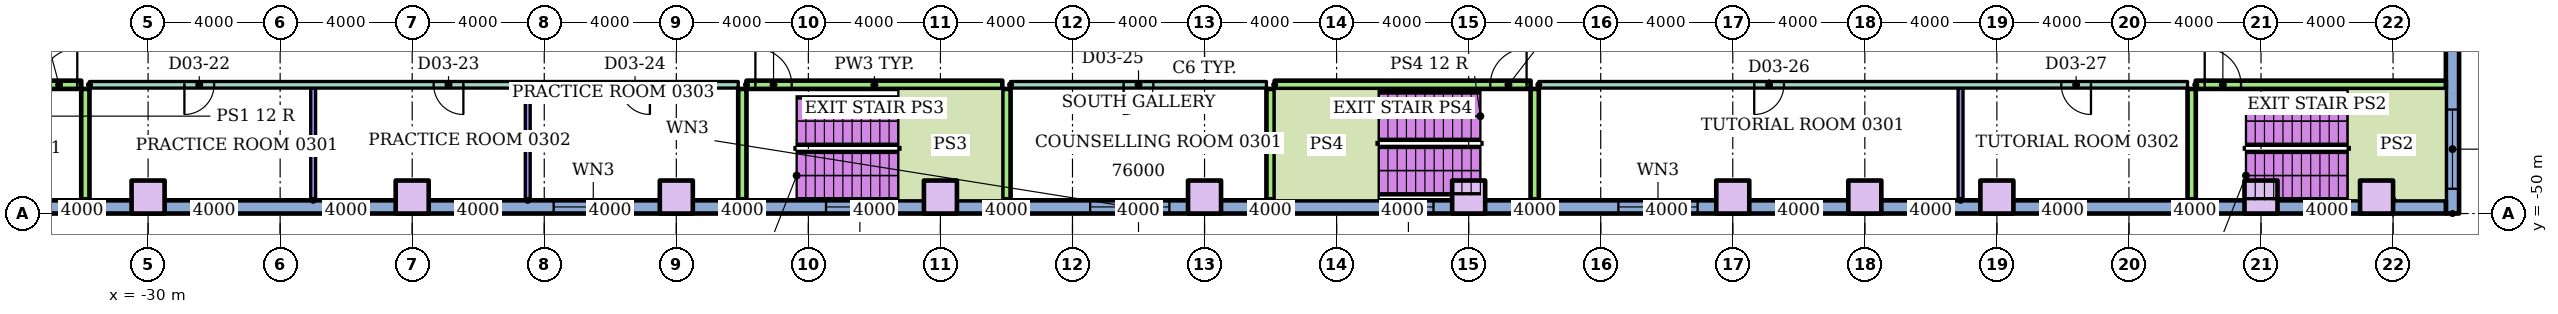
"""IFC4 building model, lengths in metres.
Left out: names, types, materials, properties, quantities, classifications, styles, units other than length and angle.
Written with IfcOpenShell. Run it as: python <this file> out.ifc"""

import sys

from ifc_helpers import new_model, si_unit, direction, frame, frame_2d, origin, origin_2d, place, context, subcontext, project, spatial, rectangle, extrude, element, fill, save


model = new_model("IFC4")
c1 = context("Model", 3, precision=1e-05, world=origin(), true_north=direction((0.0, 1.0)))
c2 = subcontext(c1, "Body", "Model", "MODEL_VIEW")
j1 = project(units=[si_unit("LENGTHUNIT", "METRE"), si_unit("PLANEANGLEUNIT", "RADIAN")], contexts=[c1])
p1 = place(None, origin())
s1 = spatial("IfcSite", under=j1, at=p1, CompositionType="ELEMENT")
p2 = place(p1, origin())
s2 = spatial("IfcBuilding", under=s1, at=p2, CompositionType="ELEMENT")
p3 = place(p2, frame((0.0, 0.0, 14.0)))
s3 = spatial("IfcBuildingStorey", under=s2, at=p3, CompositionType="ELEMENT", Elevation=14.0)
for number, where in (
    (1, (-30.0, -49.5, 0.0)),
    (2, (-22.0, -49.5, 0.0)),
    (3, (-14.0, -49.5, 0.0)),
    (4, (-6.0, -49.5, 0.0)),
    (5, (2.0, -49.5, 0.0)),
    (6, (10.0, -49.5, 0.0)),
    (7, (18.0, -49.5, 0.0)),
    (8, (22.0, -49.5, 0.0)),
    (9, (26.0, -49.5, 0.0)),
    (10, (34.0, -49.5, 0.0)),
    (11, (37.5, -49.5, 0.0)),
):
    element("IfcColumn", number, at=place(p3, frame(where)), inside=s3, PredefinedType="COLUMN", context=c2, shape_type="SweptSolid", body=[
        extrude(rectangle(XDim=1.0, YDim=1.0, at=origin_2d()), origin(), (0.0, 0.0, 1.0), 4.0),
    ])
p4 = place(p3, frame((39.8, -50.0, 0.0), z_axis=(0.0, 0.0, 1.0), x_axis=(0.0, 1.0, 0.0)))
e12 = element("IfcWall", 12, at=p4, inside=s3, PredefinedType="STANDARD", context=c2, shape_type="SweptSolid", body=[
    extrude(rectangle(XDim=70.0, YDim=0.4, at=frame_2d((35.0, 0.0))), origin(), (0.0, 0.0, 1.0), 3.7),
])
p5 = place(p4, frame((0.75, 0.0, 0.9)))
e13 = element("IfcOpeningElement", 13, at=p5, cuts=e12, PredefinedType="OPENING", context=c2, shape_type="SweptSolid", body=[
    extrude(rectangle(XDim=2.4, YDim=2.1, at=frame_2d((1.2, 1.05))), frame((0.0, 0.21, 0.0), z_axis=(0.0, -1.0, 0.0), x_axis=(1.0, 0.0, 0.0)), (0.0, 0.0, 1.0), 0.42),
])
p6 = place(p4, frame((28.863, 0.0, 0.9)))
e14 = element("IfcOpeningElement", 14, at=p6, cuts=e12, PredefinedType="OPENING", context=c2, shape_type="SweptSolid", body=[
    extrude(rectangle(XDim=2.4, YDim=2.1, at=frame_2d((1.2, 1.05))), frame((0.0, 0.21, 0.0), z_axis=(0.0, -1.0, 0.0), x_axis=(1.0, 0.0, 0.0)), (0.0, 0.0, 1.0), 0.42),
])
p7 = place(p4, frame((32.988, 0.0, 0.9)))
e15 = element("IfcOpeningElement", 15, at=p7, cuts=e12, PredefinedType="OPENING", context=c2, shape_type="SweptSolid", body=[
    extrude(rectangle(XDim=2.4, YDim=2.1, at=frame_2d((1.2, 1.05))), frame((0.0, 0.21, 0.0), z_axis=(0.0, -1.0, 0.0), x_axis=(1.0, 0.0, 0.0)), (0.0, 0.0, 1.0), 0.42),
])
p8 = place(p4, frame((37.113, 0.0, 0.9)))
e16 = element("IfcOpeningElement", 16, at=p8, cuts=e12, PredefinedType="OPENING", context=c2, shape_type="SweptSolid", body=[
    extrude(rectangle(XDim=2.4, YDim=2.1, at=frame_2d((1.2, 1.05))), frame((0.0, 0.21, 0.0), z_axis=(0.0, -1.0, 0.0), x_axis=(1.0, 0.0, 0.0)), (0.0, 0.0, 1.0), 0.42),
])
p9 = place(p4, frame((41.238, 0.0, 0.9)))
e17 = element("IfcOpeningElement", 17, at=p9, cuts=e12, PredefinedType="OPENING", context=c2, shape_type="SweptSolid", body=[
    extrude(rectangle(XDim=2.4, YDim=2.1, at=frame_2d((1.2, 1.05))), frame((0.0, 0.21, 0.0), z_axis=(0.0, -1.0, 0.0), x_axis=(1.0, 0.0, 0.0)), (0.0, 0.0, 1.0), 0.42),
])
p10 = place(p4, frame((45.363, 0.0, 0.9)))
e18 = element("IfcOpeningElement", 18, at=p10, cuts=e12, PredefinedType="OPENING", context=c2, shape_type="SweptSolid", body=[
    extrude(rectangle(XDim=2.4, YDim=2.1, at=frame_2d((1.2, 1.05))), frame((0.0, 0.21, 0.0), z_axis=(0.0, -1.0, 0.0), x_axis=(1.0, 0.0, 0.0)), (0.0, 0.0, 1.0), 0.42),
])
p11 = place(p4, frame((49.488, 0.0, 0.9)))
e19 = element("IfcOpeningElement", 19, at=p11, cuts=e12, PredefinedType="OPENING", context=c2, shape_type="SweptSolid", body=[
    extrude(rectangle(XDim=2.4, YDim=2.1, at=frame_2d((1.2, 1.05))), frame((0.0, 0.21, 0.0), z_axis=(0.0, -1.0, 0.0), x_axis=(1.0, 0.0, 0.0)), (0.0, 0.0, 1.0), 0.42),
])
p12 = place(p4, frame((53.613, 0.0, 0.9)))
e20 = element("IfcOpeningElement", 20, at=p12, cuts=e12, PredefinedType="OPENING", context=c2, shape_type="SweptSolid", body=[
    extrude(rectangle(XDim=2.4, YDim=2.1, at=frame_2d((1.2, 1.05))), frame((0.0, 0.21, 0.0), z_axis=(0.0, -1.0, 0.0), x_axis=(1.0, 0.0, 0.0)), (0.0, 0.0, 1.0), 0.42),
])
p13 = place(p4, frame((57.738, 0.0, 0.9)))
e21 = element("IfcOpeningElement", 21, at=p13, cuts=e12, PredefinedType="OPENING", context=c2, shape_type="SweptSolid", body=[
    extrude(rectangle(XDim=2.4, YDim=2.1, at=frame_2d((1.2, 1.05))), frame((0.0, 0.21, 0.0), z_axis=(0.0, -1.0, 0.0), x_axis=(1.0, 0.0, 0.0)), (0.0, 0.0, 1.0), 0.42),
])
p14 = place(p4, frame((62.05, 0.0, 0.9)))
e22 = element("IfcOpeningElement", 22, at=p14, cuts=e12, PredefinedType="OPENING", context=c2, shape_type="SweptSolid", body=[
    extrude(rectangle(XDim=2.4, YDim=2.1, at=frame_2d((1.2, 1.05))), frame((0.0, 0.21, 0.0), z_axis=(0.0, -1.0, 0.0), x_axis=(1.0, 0.0, 0.0)), (0.0, 0.0, 1.0), 0.42),
])
p15 = place(p4, frame((66.55, 0.0, 0.9)))
e23 = element("IfcOpeningElement", 23, at=p15, cuts=e12, PredefinedType="OPENING", context=c2, shape_type="SweptSolid", body=[
    extrude(rectangle(XDim=2.4, YDim=2.1, at=frame_2d((1.2, 1.05))), frame((0.0, 0.21, 0.0), z_axis=(0.0, -1.0, 0.0), x_axis=(1.0, 0.0, 0.0)), (0.0, 0.0, 1.0), 0.42),
])
p16 = place(p3, frame((-39.6, -49.8, 0.0)))
e24 = element("IfcWall", 24, at=p16, inside=s3, PredefinedType="STANDARD", context=c2, shape_type="SweptSolid", body=[
    extrude(rectangle(XDim=79.2, YDim=0.4, at=frame_2d((39.6, 0.0))), origin(), (0.0, 0.0, 1.0), 3.7),
])
p17 = place(p16, frame((21.885, 0.0, 0.9)))
e25 = element("IfcOpeningElement", 25, at=p17, cuts=e24, PredefinedType="OPENING", context=c2, shape_type="SweptSolid", body=[
    extrude(rectangle(XDim=2.4, YDim=2.1, at=frame_2d((1.2, 1.05))), frame((0.0, 0.21, 0.0), z_axis=(0.0, -1.0, 0.0), x_axis=(1.0, 0.0, 0.0)), (0.0, 0.0, 1.0), 0.42),
])
p18 = place(p16, frame((30.135, 0.0, 0.9)))
e26 = element("IfcOpeningElement", 26, at=p18, cuts=e24, PredefinedType="OPENING", context=c2, shape_type="SweptSolid", body=[
    extrude(rectangle(XDim=2.05, YDim=2.1, at=frame_2d((1.025, 1.05))), frame((0.0, 0.21, 0.0), z_axis=(0.0, -1.0, 0.0), x_axis=(1.0, 0.0, 0.0)), (0.0, 0.0, 1.0), 0.42),
])
p19 = place(p16, frame((38.135, 0.0, 0.9)))
e27 = element("IfcOpeningElement", 27, at=p19, cuts=e24, PredefinedType="OPENING", context=c2, shape_type="SweptSolid", body=[
    extrude(rectangle(XDim=2.4, YDim=2.1, at=frame_2d((1.2, 1.05))), frame((0.0, 0.21, 0.0), z_axis=(0.0, -1.0, 0.0), x_axis=(1.0, 0.0, 0.0)), (0.0, 0.0, 1.0), 0.42),
])
p20 = place(p16, frame((47.015, 0.0, 0.9)))
e28 = element("IfcOpeningElement", 28, at=p20, cuts=e24, PredefinedType="OPENING", context=c2, shape_type="SweptSolid", body=[
    extrude(rectangle(XDim=1.52, YDim=2.1, at=frame_2d((0.76, 1.05))), frame((0.0, 0.21, 0.0), z_axis=(0.0, -1.0, 0.0), x_axis=(1.0, 0.0, 0.0)), (0.0, 0.0, 1.0), 0.42),
])
p21 = place(p16, frame((54.135, 0.0, 0.9)))
e29 = element("IfcOpeningElement", 29, at=p21, cuts=e24, PredefinedType="OPENING", context=c2, shape_type="SweptSolid", body=[
    extrude(rectangle(XDim=2.4, YDim=2.1, at=frame_2d((1.2, 1.05))), frame((0.0, 0.21, 0.0), z_axis=(0.0, -1.0, 0.0), x_axis=(1.0, 0.0, 0.0)), (0.0, 0.0, 1.0), 0.42),
])
p22 = place(p3, frame((-31.775, -46.1, 0.0)))
e30 = element("IfcWall", 30, at=p22, inside=s3, PredefinedType="PARTITIONING", context=c2, shape_type="SweptSolid", body=[
    extrude(rectangle(XDim=19.65, YDim=0.2, at=frame_2d((9.825, 0.0))), origin(), (0.0, 0.0, 1.0), 3.7),
])
p23 = place(p22, frame((2.875, 0.0, 0.0)))
e31 = element("IfcOpeningElement", 31, at=p23, cuts=e30, PredefinedType="OPENING", context=c2, shape_type="SweptSolid", body=[
    extrude(rectangle(XDim=0.9, YDim=2.1, at=frame_2d((0.45, 1.05))), frame((0.0, 0.11, 0.0), z_axis=(0.0, -1.0, 0.0), x_axis=(1.0, 0.0, 0.0)), (0.0, 0.0, 1.0), 0.22),
])
p24 = place(p22, frame((10.425, 0.0, 0.0)))
e32 = element("IfcOpeningElement", 32, at=p24, cuts=e30, PredefinedType="OPENING", context=c2, shape_type="SweptSolid", body=[
    extrude(rectangle(XDim=0.9, YDim=2.1, at=frame_2d((0.45, 1.05))), frame((0.0, 0.11, 0.0), z_axis=(0.0, -1.0, 0.0), x_axis=(1.0, 0.0, 0.0)), (0.0, 0.0, 1.0), 0.22),
])
p25 = place(p22, frame((16.075, 0.0, 0.0)))
e33 = element("IfcOpeningElement", 33, at=p25, cuts=e30, PredefinedType="OPENING", context=c2, shape_type="SweptSolid", body=[
    extrude(rectangle(XDim=0.9, YDim=2.1, at=frame_2d((0.45, 1.05))), frame((0.0, 0.11, 0.0), z_axis=(0.0, -1.0, 0.0), x_axis=(1.0, 0.0, 0.0)), (0.0, 0.0, 1.0), 0.22),
])
p26 = place(p3, frame((-3.875, -46.1, 0.0)))
e34 = element("IfcWall", 34, at=p26, inside=s3, PredefinedType="PARTITIONING", context=c2, shape_type="SweptSolid", body=[
    extrude(rectangle(XDim=7.75, YDim=0.2, at=frame_2d((3.875, 0.0))), origin(), (0.0, 0.0, 1.0), 3.7),
])
p27 = place(p26, frame((3.425, 0.0, 0.0)))
e35 = element("IfcOpeningElement", 35, at=p27, cuts=e34, PredefinedType="OPENING", context=c2, shape_type="SweptSolid", body=[
    extrude(rectangle(XDim=0.9, YDim=2.1, at=frame_2d((0.45, 1.05))), frame((0.0, 0.11, 0.0), z_axis=(0.0, -1.0, 0.0), x_axis=(1.0, 0.0, 0.0)), (0.0, 0.0, 1.0), 0.22),
])
p28 = place(p3, frame((12.125, -46.1, 0.0)))
e36 = element("IfcWall", 36, at=p28, inside=s3, PredefinedType="PARTITIONING", context=c2, shape_type="SweptSolid", body=[
    extrude(rectangle(XDim=19.65, YDim=0.2, at=frame_2d((9.825, 0.0))), origin(), (0.0, 0.0, 1.0), 3.7),
])
p29 = place(p28, frame((6.525, 0.0, 0.0)))
e37 = element("IfcOpeningElement", 37, at=p29, cuts=e36, PredefinedType="OPENING", context=c2, shape_type="SweptSolid", body=[
    extrude(rectangle(XDim=0.9, YDim=2.1, at=frame_2d((0.45, 1.05))), frame((0.0, 0.11, 0.0), z_axis=(0.0, -1.0, 0.0), x_axis=(1.0, 0.0, 0.0)), (0.0, 0.0, 1.0), 0.22),
])
p30 = place(p28, frame((15.825, 0.0, 0.0)))
e38 = element("IfcOpeningElement", 38, at=p30, cuts=e36, PredefinedType="OPENING", context=c2, shape_type="SweptSolid", body=[
    extrude(rectangle(XDim=0.9, YDim=2.1, at=frame_2d((0.45, 1.05))), frame((0.0, 0.11, 0.0), z_axis=(0.0, -1.0, 0.0), x_axis=(1.0, 0.0, 0.0)), (0.0, 0.0, 1.0), 0.22),
])
p31 = place(p3, frame((-39.6, -46.1, 0.0)))
e39 = element("IfcWall", 39, at=p31, inside=s3, PredefinedType="SOLIDWALL", context=c2, shape_type="SweptSolid", body=[
    extrude(rectangle(XDim=7.575, YDim=0.25, at=frame_2d((3.788, 0.0))), origin(), (0.0, 0.0, 1.0), 3.7),
])
p32 = place(p31, frame((6.355, 0.0, 0.0)))
e40 = element("IfcOpeningElement", 40, at=p32, cuts=e39, PredefinedType="OPENING", context=c2, shape_type="SweptSolid", body=[
    extrude(rectangle(XDim=1.1, YDim=2.1, at=frame_2d((0.55, 1.05))), frame((0.0, 0.135, 0.0), z_axis=(0.0, -1.0, 0.0), x_axis=(1.0, 0.0, 0.0)), (0.0, 0.0, 1.0), 0.27),
])
p33 = place(p3, frame((-11.875, -46.1, 0.0)))
e41 = element("IfcWall", 41, at=p33, inside=s3, PredefinedType="SOLIDWALL", context=c2, shape_type="SweptSolid", body=[
    extrude(rectangle(XDim=7.75, YDim=0.25, at=frame_2d((3.875, 0.0))), origin(), (0.0, 0.0, 1.0), 3.7),
])
p34 = place(p33, frame((0.27, 0.0, 0.0)))
e42 = element("IfcOpeningElement", 42, at=p34, cuts=e41, PredefinedType="OPENING", context=c2, shape_type="SweptSolid", body=[
    extrude(rectangle(XDim=1.1, YDim=2.1, at=frame_2d((0.55, 1.05))), frame((0.0, 0.135, 0.0), z_axis=(0.0, -1.0, 0.0), x_axis=(1.0, 0.0, 0.0)), (0.0, 0.0, 1.0), 0.27),
])
p35 = place(p3, frame((4.125, -46.1, 0.0)))
e43 = element("IfcWall", 43, at=p35, inside=s3, PredefinedType="SOLIDWALL", context=c2, shape_type="SweptSolid", body=[
    extrude(rectangle(XDim=7.75, YDim=0.25, at=frame_2d((3.875, 0.0))), origin(), (0.0, 0.0, 1.0), 3.7),
])
p36 = place(p35, frame((6.53, 0.0, 0.0)))
e44 = element("IfcOpeningElement", 44, at=p36, cuts=e43, PredefinedType="OPENING", context=c2, shape_type="SweptSolid", body=[
    extrude(rectangle(XDim=1.1, YDim=2.1, at=frame_2d((0.55, 1.05))), frame((0.0, 0.135, 0.0), z_axis=(0.0, -1.0, 0.0), x_axis=(1.0, 0.0, 0.0)), (0.0, 0.0, 1.0), 0.27),
])
p37 = place(p3, frame((32.025, -46.1, 0.0)))
e45 = element("IfcWall", 45, at=p37, inside=s3, PredefinedType="SOLIDWALL", context=c2, shape_type="SweptSolid", body=[
    extrude(rectangle(XDim=7.575, YDim=0.25, at=frame_2d((3.788, 0.0))), origin(), (0.0, 0.0, 1.0), 3.7),
])
p38 = place(p37, frame((0.27, 0.0, 0.0)))
e46 = element("IfcOpeningElement", 46, at=p38, cuts=e45, PredefinedType="OPENING", context=c2, shape_type="SweptSolid", body=[
    extrude(rectangle(XDim=1.1, YDim=2.1, at=frame_2d((0.55, 1.05))), frame((0.0, 0.135, 0.0), z_axis=(0.0, -1.0, 0.0), x_axis=(1.0, 0.0, 0.0)), (0.0, 0.0, 1.0), 0.27),
])
p39 = place(p3, frame((-31.9, -49.6, 0.0), z_axis=(0.0, 0.0, 1.0), x_axis=(0.0, 1.0, 0.0)))
e47 = element("IfcWall", 47, at=p39, inside=s3, PredefinedType="SOLIDWALL", context=c2, shape_type="SweptSolid", body=[
    extrude(rectangle(XDim=3.375, YDim=0.25, at=frame_2d((1.688, 0.0))), origin(), (0.0, 0.0, 1.0), 3.7),
])
for number, where, z_axis, x_axis in (
    (48, (-25.0, -49.6, 0.0), (0.0, 0.0, 1.0), (0.0, 1.0, 0.0)),
    (49, (-18.5, -49.6, 0.0), (0.0, 0.0, 1.0), (0.0, 1.0, 0.0)),
):
    element("IfcWall", number, at=place(p3, frame(where, z_axis=z_axis, x_axis=x_axis)), inside=s3, PredefinedType="PARTITIONING", context=c2, shape_type="SweptSolid", body=[
        extrude(rectangle(XDim=3.4, YDim=0.15, at=frame_2d((1.7, 0.0))), origin(), (0.0, 0.0, 1.0), 3.7),
    ])
for number, where, z_axis, x_axis in (
    (50, (-12.0, -49.6, 0.0), (0.0, 0.0, 1.0), (0.0, 1.0, 0.0)),
    (51, (-4.0, -49.6, 0.0), (0.0, 0.0, 1.0), (0.0, 1.0, 0.0)),
    (52, (4.0, -49.6, 0.0), (0.0, 0.0, 1.0), (0.0, 1.0, 0.0)),
    (53, (12.0, -49.6, 0.0), (0.0, 0.0, 1.0), (0.0, 1.0, 0.0)),
):
    element("IfcWall", number, at=place(p3, frame(where, z_axis=z_axis, x_axis=x_axis)), inside=s3, PredefinedType="SOLIDWALL", context=c2, shape_type="SweptSolid", body=[
        extrude(rectangle(XDim=3.375, YDim=0.25, at=frame_2d((1.688, 0.0))), origin(), (0.0, 0.0, 1.0), 3.7),
    ])
p40 = place(p3, frame((24.9, -49.6, 0.0), z_axis=(0.0, 0.0, 1.0), x_axis=(0.0, 1.0, 0.0)))
e54 = element("IfcWall", 54, at=p40, inside=s3, PredefinedType="PARTITIONING", context=c2, shape_type="SweptSolid", body=[
    extrude(rectangle(XDim=3.4, YDim=0.15, at=frame_2d((1.7, 0.0))), origin(), (0.0, 0.0, 1.0), 3.7),
])
p41 = place(p3, frame((31.9, -49.6, 0.0), z_axis=(0.0, 0.0, 1.0), x_axis=(0.0, 1.0, 0.0)))
e55 = element("IfcWall", 55, at=p41, inside=s3, PredefinedType="SOLIDWALL", context=c2, shape_type="SweptSolid", body=[
    extrude(rectangle(XDim=3.375, YDim=0.25, at=frame_2d((1.688, 0.0))), origin(), (0.0, 0.0, 1.0), 3.7),
])
p42 = place(p5, origin())
e56 = element("IfcWindow", 56, at=p42, inside=s3, PartitioningType="SINGLE_PANEL", PredefinedType="WINDOW", context=c2, shape_type="SweptSolid", body=[
    extrude(rectangle(XDim=2.4, YDim=2.1, at=frame_2d((1.2, 1.05))), frame((0.0, 0.03, 0.0), z_axis=(0.0, -1.0, 0.0), x_axis=(1.0, 0.0, 0.0)), (0.0, 0.0, 1.0), 0.06),
])
fill(e13, e56)
p43 = place(p17, origin())
e57 = element("IfcWindow", 57, at=p43, inside=s3, PartitioningType="SINGLE_PANEL", PredefinedType="WINDOW", context=c2, shape_type="SweptSolid", body=[
    extrude(rectangle(XDim=2.4, YDim=2.1, at=frame_2d((1.2, 1.05))), frame((0.0, 0.03, 0.0), z_axis=(0.0, -1.0, 0.0), x_axis=(1.0, 0.0, 0.0)), (0.0, 0.0, 1.0), 0.06),
])
fill(e25, e57)
p44 = place(p18, origin())
e58 = element("IfcWindow", 58, at=p44, inside=s3, PartitioningType="SINGLE_PANEL", PredefinedType="WINDOW", context=c2, shape_type="SweptSolid", body=[
    extrude(rectangle(XDim=2.05, YDim=2.1, at=frame_2d((1.025, 1.05))), frame((0.0, 0.03, 0.0), z_axis=(0.0, -1.0, 0.0), x_axis=(1.0, 0.0, 0.0)), (0.0, 0.0, 1.0), 0.06),
])
fill(e26, e58)
p45 = place(p19, origin())
e59 = element("IfcWindow", 59, at=p45, inside=s3, PartitioningType="SINGLE_PANEL", PredefinedType="WINDOW", context=c2, shape_type="SweptSolid", body=[
    extrude(rectangle(XDim=2.4, YDim=2.1, at=frame_2d((1.2, 1.05))), frame((0.0, 0.03, 0.0), z_axis=(0.0, -1.0, 0.0), x_axis=(1.0, 0.0, 0.0)), (0.0, 0.0, 1.0), 0.06),
])
fill(e27, e59)
p46 = place(p20, origin())
e60 = element("IfcWindow", 60, at=p46, inside=s3, PartitioningType="SINGLE_PANEL", PredefinedType="WINDOW", context=c2, shape_type="SweptSolid", body=[
    extrude(rectangle(XDim=1.52, YDim=2.1, at=frame_2d((0.76, 1.05))), frame((0.0, 0.03, 0.0), z_axis=(0.0, -1.0, 0.0), x_axis=(1.0, 0.0, 0.0)), (0.0, 0.0, 1.0), 0.06),
])
fill(e28, e60)
p47 = place(p21, origin())
e61 = element("IfcWindow", 61, at=p47, inside=s3, PartitioningType="SINGLE_PANEL", PredefinedType="WINDOW", context=c2, shape_type="SweptSolid", body=[
    extrude(rectangle(XDim=2.4, YDim=2.1, at=frame_2d((1.2, 1.05))), frame((0.0, 0.03, 0.0), z_axis=(0.0, -1.0, 0.0), x_axis=(1.0, 0.0, 0.0)), (0.0, 0.0, 1.0), 0.06),
])
fill(e29, e61)
p48 = place(p23, frame((0.9, 0.0, 0.0), z_axis=(0.0, 0.0, 1.0), x_axis=(-1.0, 0.0, 0.0)))
e62 = element("IfcDoor", 62, at=p48, inside=s3, OperationType="SINGLE_SWING_LEFT", PredefinedType="DOOR", context=c2, shape_type="SweptSolid", body=[
    extrude(rectangle(XDim=0.9, YDim=2.1, at=frame_2d((0.45, 1.05))), frame((0.0, 0.025, 0.0), z_axis=(0.0, -1.0, 0.0), x_axis=(1.0, 0.0, 0.0)), (0.0, 0.0, 1.0), 0.05),
])
fill(e31, e62)
p49 = place(p24, frame((0.9, 0.0, 0.0), z_axis=(0.0, 0.0, 1.0), x_axis=(-1.0, 0.0, 0.0)))
e63 = element("IfcDoor", 63, at=p49, inside=s3, OperationType="SINGLE_SWING_RIGHT", PredefinedType="DOOR", context=c2, shape_type="SweptSolid", body=[
    extrude(rectangle(XDim=0.9, YDim=2.1, at=frame_2d((0.45, 1.05))), frame((0.0, 0.025, 0.0), z_axis=(0.0, -1.0, 0.0), x_axis=(1.0, 0.0, 0.0)), (0.0, 0.0, 1.0), 0.05),
])
fill(e32, e63)
p50 = place(p25, frame((0.9, 0.0, 0.0), z_axis=(0.0, 0.0, 1.0), x_axis=(-1.0, 0.0, 0.0)))
e64 = element("IfcDoor", 64, at=p50, inside=s3, OperationType="SINGLE_SWING_RIGHT", PredefinedType="DOOR", context=c2, shape_type="SweptSolid", body=[
    extrude(rectangle(XDim=0.9, YDim=2.1, at=frame_2d((0.45, 1.05))), frame((0.0, 0.025, 0.0), z_axis=(0.0, -1.0, 0.0), x_axis=(1.0, 0.0, 0.0)), (0.0, 0.0, 1.0), 0.05),
])
fill(e33, e64)
p51 = place(p27, frame((0.9, 0.0, 0.0), z_axis=(0.0, 0.0, 1.0), x_axis=(-1.0, 0.0, 0.0)))
e65 = element("IfcDoor", 65, at=p51, inside=s3, OperationType="SINGLE_SWING_LEFT", PredefinedType="DOOR", context=c2, shape_type="SweptSolid", body=[
    extrude(rectangle(XDim=0.9, YDim=2.1, at=frame_2d((0.45, 1.05))), frame((0.0, 0.025, 0.0), z_axis=(0.0, -1.0, 0.0), x_axis=(1.0, 0.0, 0.0)), (0.0, 0.0, 1.0), 0.05),
])
fill(e35, e65)
p52 = place(p29, frame((0.9, 0.0, 0.0), z_axis=(0.0, 0.0, 1.0), x_axis=(-1.0, 0.0, 0.0)))
e66 = element("IfcDoor", 66, at=p52, inside=s3, OperationType="SINGLE_SWING_LEFT", PredefinedType="DOOR", context=c2, shape_type="SweptSolid", body=[
    extrude(rectangle(XDim=0.9, YDim=2.1, at=frame_2d((0.45, 1.05))), frame((0.0, 0.025, 0.0), z_axis=(0.0, -1.0, 0.0), x_axis=(1.0, 0.0, 0.0)), (0.0, 0.0, 1.0), 0.05),
])
fill(e37, e66)
p53 = place(p30, frame((0.9, 0.0, 0.0), z_axis=(0.0, 0.0, 1.0), x_axis=(-1.0, 0.0, 0.0)))
e67 = element("IfcDoor", 67, at=p53, inside=s3, OperationType="SINGLE_SWING_RIGHT", PredefinedType="DOOR", context=c2, shape_type="SweptSolid", body=[
    extrude(rectangle(XDim=0.9, YDim=2.1, at=frame_2d((0.45, 1.05))), frame((0.0, 0.025, 0.0), z_axis=(0.0, -1.0, 0.0), x_axis=(1.0, 0.0, 0.0)), (0.0, 0.0, 1.0), 0.05),
])
fill(e38, e67)
p54 = place(p32, origin())
e68 = element("IfcDoor", 68, at=p54, inside=s3, OperationType="SINGLE_SWING_RIGHT", PredefinedType="DOOR", context=c2, shape_type="SweptSolid", body=[
    extrude(rectangle(XDim=1.1, YDim=2.1, at=frame_2d((0.55, 1.05))), frame((0.0, 0.025, 0.0), z_axis=(0.0, -1.0, 0.0), x_axis=(1.0, 0.0, 0.0)), (0.0, 0.0, 1.0), 0.05),
])
fill(e40, e68)
p55 = place(p38, origin())
e69 = element("IfcDoor", 69, at=p55, inside=s3, OperationType="SINGLE_SWING_LEFT", PredefinedType="DOOR", context=c2, shape_type="SweptSolid", body=[
    extrude(rectangle(XDim=1.1, YDim=2.1, at=frame_2d((0.55, 1.05))), frame((0.0, 0.025, 0.0), z_axis=(0.0, -1.0, 0.0), x_axis=(1.0, 0.0, 0.0)), (0.0, 0.0, 1.0), 0.05),
])
fill(e46, e69)
p56 = place(p34, origin())
e70 = element("IfcDoor", 70, at=p56, inside=s3, OperationType="SINGLE_SWING_LEFT", PredefinedType="DOOR", context=c2, shape_type="SweptSolid", body=[
    extrude(rectangle(XDim=1.1, YDim=2.1, at=frame_2d((0.55, 1.05))), frame((0.0, 0.025, 0.0), z_axis=(0.0, -1.0, 0.0), x_axis=(1.0, 0.0, 0.0)), (0.0, 0.0, 1.0), 0.05),
])
fill(e42, e70)
p57 = place(p36, origin())
e71 = element("IfcDoor", 71, at=p57, inside=s3, OperationType="SINGLE_SWING_RIGHT", PredefinedType="DOOR", context=c2, shape_type="SweptSolid", body=[
    extrude(rectangle(XDim=1.1, YDim=2.1, at=frame_2d((0.55, 1.05))), frame((0.0, 0.025, 0.0), z_axis=(0.0, -1.0, 0.0), x_axis=(1.0, 0.0, 0.0)), (0.0, 0.0, 1.0), 0.05),
])
fill(e44, e71)
save(model, sys.argv[1])
